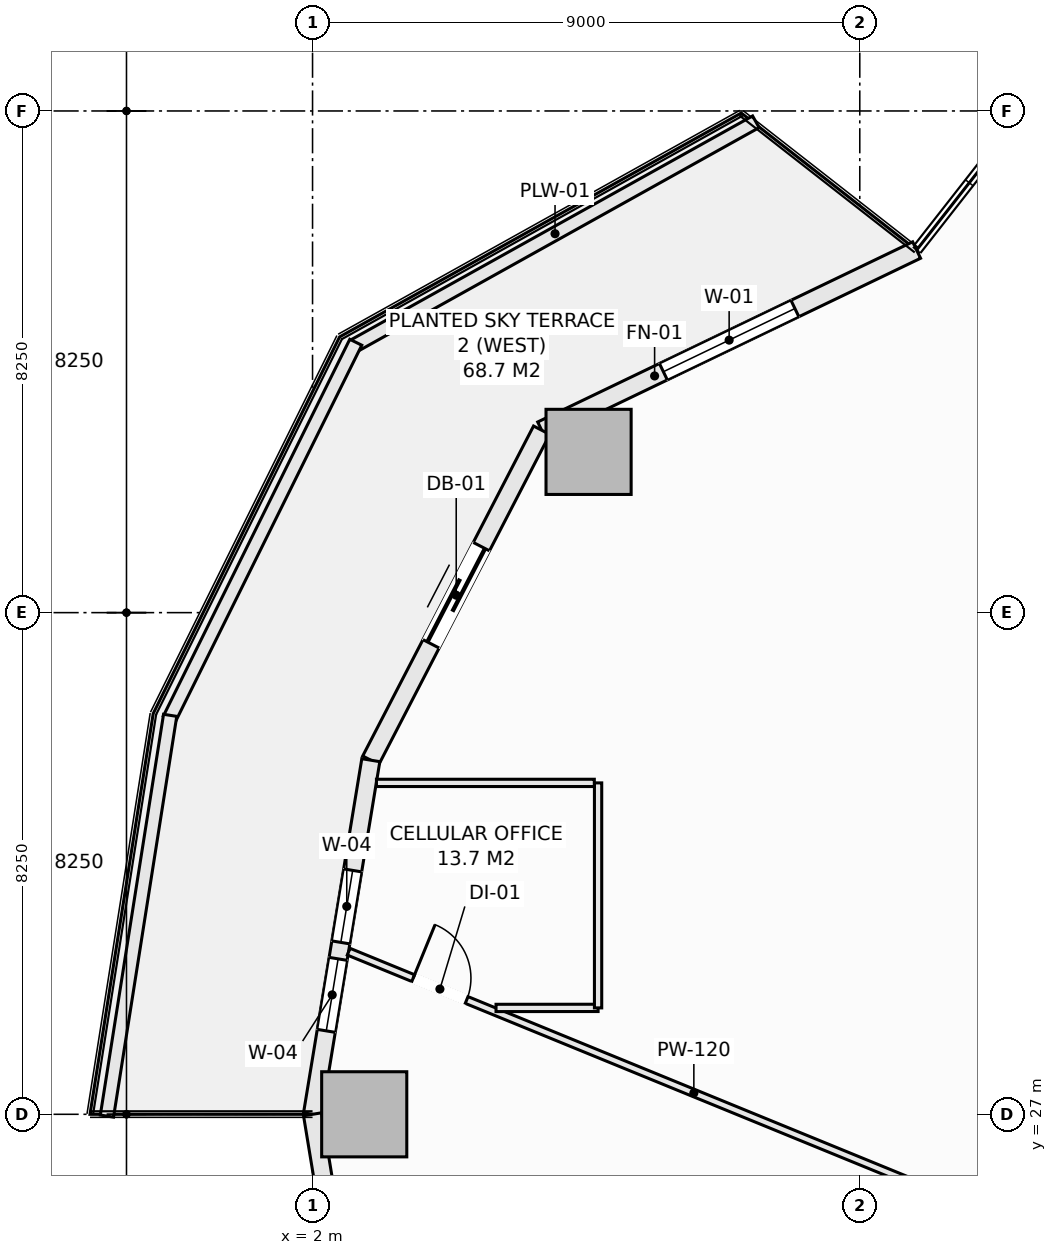
"""IFC4 building model, lengths in metres.
Left out: names, types, materials, properties, quantities, classifications, styles, units other than length and angle.
Written with IfcOpenShell. Run it as: python <this file> out.ifc"""

import sys

from ifc_helpers import new_model, si_unit, direction, frame, frame_2d, origin, origin_2d, place, context, subcontext, project, spatial, rectangle, extrude, element, fill, save


model = new_model("IFC4")
c1 = context("Model", 3, precision=1e-05, world=origin(), true_north=direction((0.0, 1.0)))
c2 = subcontext(c1, "Body", "Model", "MODEL_VIEW")
j1 = project(units=[si_unit("LENGTHUNIT", "METRE"), si_unit("PLANEANGLEUNIT", "RADIAN")], contexts=[c1])
p1 = place(None, origin())
s1 = spatial("IfcSite", under=j1, at=p1, CompositionType="ELEMENT")
p2 = place(p1, origin())
s2 = spatial("IfcBuilding", under=s1, at=p2, CompositionType="ELEMENT")
p3 = place(p2, frame((0.0, 0.0, 30.35)))
s3 = spatial("IfcBuildingStorey", under=s2, at=p3, CompositionType="ELEMENT", Elevation=30.35)
for number, where, z_axis, x_axis in (
    (1, (6.54, 37.894, -0.28), (0.0, 0.0, 1.0), (1.0, 0.0, 0.0)),
    (2, (2.85, 27.0, -0.28), (0.0, 0.0, 1.0), (1.0, 0.0, 0.0)),
):
    element("IfcColumn", number, at=place(p3, frame(where, z_axis=z_axis, x_axis=x_axis)), inside=s3, PredefinedType="COLUMN", context=c2, shape_type="SweptSolid", body=[
        extrude(rectangle(XDim=1.4, YDim=1.4, at=origin_2d()), origin(), (0.0, 0.0, 1.0), 3.85),
    ])
p4 = place(p3, frame((5.768, 38.25, 0.0), z_axis=(0.0, 0.0, 1.0), x_axis=(0.901360393999, 0.433069786673, 0.0)))
e3 = element("IfcWall", 3, at=p4, inside=s3, PredefinedType="SOLIDWALL", context=c2, shape_type="SweptSolid", body=[
    extrude(rectangle(XDim=6.842, YDim=0.3, at=frame_2d((3.421, 0.0))), origin(), (0.0, 0.0, 1.0), 3.093),
])
p5 = place(p4, frame((2.221, 0.0, 0.85)))
e4 = element("IfcOpeningElement", 4, at=p5, cuts=e3, PredefinedType="OPENING", context=c2, shape_type="SweptSolid", body=[
    extrude(rectangle(XDim=2.4, YDim=1.9, at=frame_2d((1.2, 0.95))), frame((0.0, 0.16, 0.0), z_axis=(0.0, -1.0, 0.0), x_axis=(1.0, 0.0, 0.0)), (0.0, 0.0, 1.0), 0.32),
])
p6 = place(p3, frame((2.958, 32.823, 0.0), z_axis=(0.0, 0.0, 1.0), x_axis=(0.459809804413, 0.88801742312, 0.0)))
e5 = element("IfcWall", 5, at=p6, inside=s3, PredefinedType="SOLIDWALL", context=c2, shape_type="SweptSolid", body=[
    extrude(rectangle(XDim=6.111, YDim=0.3, at=frame_2d((3.055, 0.0))), origin(), (0.0, 0.0, 1.0), 3.093),
])
p7 = place(p6, frame((2.155, 0.0, 0.0)))
e6 = element("IfcOpeningElement", 6, at=p7, cuts=e5, PredefinedType="OPENING", context=c2, shape_type="SweptSolid", body=[
    extrude(rectangle(XDim=1.8, YDim=2.25, at=frame_2d((0.9, 1.125))), frame((0.0, 0.16, 0.0), z_axis=(0.0, -1.0, 0.0), x_axis=(1.0, 0.0, 0.0)), (0.0, 0.0, 1.0), 0.32),
])
p8 = place(p3, frame((2.0, 27.0, 0.0), z_axis=(0.0, 0.0, 1.0), x_axis=(0.162366057843, 0.98673059305, 0.0)))
e7 = element("IfcWall", 7, at=p8, inside=s3, PredefinedType="SOLIDWALL", context=c2, shape_type="SweptSolid", body=[
    extrude(rectangle(XDim=5.902, YDim=0.3, at=frame_2d((2.951, 0.0))), origin(), (0.0, 0.0, 1.0), 3.093),
])
p9 = place(p8, frame((1.391, 0.0, 0.85)))
e8 = element("IfcOpeningElement", 8, at=p9, cuts=e7, PredefinedType="OPENING", context=c2, shape_type="SweptSolid", body=[
    extrude(rectangle(XDim=1.2, YDim=1.9, at=frame_2d((0.6, 0.95))), frame((0.0, 0.16, 0.0), z_axis=(0.0, -1.0, 0.0), x_axis=(1.0, 0.0, 0.0)), (0.0, 0.0, 1.0), 0.32),
])
p10 = place(p8, frame((2.865, 0.0, 0.85)))
e9 = element("IfcOpeningElement", 9, at=p10, cuts=e7, PredefinedType="OPENING", context=c2, shape_type="SweptSolid", body=[
    extrude(rectangle(XDim=1.2, YDim=1.9, at=frame_2d((0.6, 0.95))), frame((0.0, 0.16, 0.0), z_axis=(0.0, -1.0, 0.0), x_axis=(1.0, 0.0, 0.0)), (0.0, 0.0, 1.0), 0.32),
])
p11 = place(p3, frame((2.0, 27.0, 0.0), z_axis=(0.0, 0.0, 1.0), x_axis=(0.162366057843, -0.98673059305, 0.0)))
e10 = element("IfcWall", 10, at=p11, inside=s3, PredefinedType="SOLIDWALL", context=c2, shape_type="SweptSolid", body=[
    extrude(rectangle(XDim=5.902, YDim=0.3, at=frame_2d((2.951, 0.0))), origin(), (0.0, 0.0, 1.0), 3.093),
])
p12 = place(p11, frame((1.751, 0.0, 0.85)))
e11 = element("IfcOpeningElement", 11, at=p12, cuts=e10, PredefinedType="OPENING", context=c2, shape_type="SweptSolid", body=[
    extrude(rectangle(XDim=2.4, YDim=1.9, at=frame_2d((1.2, 0.95))), frame((0.0, 0.16, 0.0), z_axis=(0.0, -1.0, 0.0), x_axis=(1.0, 0.0, 0.0)), (0.0, 0.0, 1.0), 0.32),
])
p13 = place(p3, frame((2.685, 39.641, 0.0), z_axis=(0.0, 0.0, 1.0), x_axis=(0.873500119739, 0.48682393205, 0.0)))
e12 = element("IfcWall", 12, at=p13, inside=s3, PredefinedType="PARAPET", context=c2, shape_type="SweptSolid", body=[
    extrude(rectangle(XDim=7.562, YDim=0.22, at=frame_2d((3.781, 0.0))), origin(), (0.0, 0.0, 1.0), 0.52),
])
p14 = place(p3, frame((-0.354, 33.502, 0.0), z_axis=(0.0, 0.0, 1.0), x_axis=(0.443578479433, 0.8962355341, 0.0)))
e13 = element("IfcWall", 13, at=p14, inside=s3, PredefinedType="PARAPET", context=c2, shape_type="SweptSolid", body=[
    extrude(rectangle(XDim=6.911, YDim=0.22, at=frame_2d((3.456, 0.0))), origin(), (0.0, 0.0, 1.0), 0.52),
])
p15 = place(p3, frame((-1.382, 26.971, 0.0), z_axis=(0.0, 0.0, 1.0), x_axis=(0.155842315528, 0.987781945923, 0.0)))
e14 = element("IfcWall", 14, at=p15, inside=s3, PredefinedType="PARAPET", context=c2, shape_type="SweptSolid", body=[
    extrude(rectangle(XDim=6.672, YDim=0.22, at=frame_2d((3.336, 0.0))), origin(), (0.0, 0.0, 1.0), 0.52),
])
p16 = place(p3, frame((2.594, 29.674, 0.0), z_axis=(0.0, 0.0, 1.0), x_axis=(0.925471493768, -0.378817257029, 0.0)))
e15 = element("IfcWall", 15, at=p16, inside=s3, PredefinedType="PARTITIONING", context=c2, shape_type="SweptSolid", body=[
    extrude(rectangle(XDim=12.268, YDim=0.12, at=frame_2d((6.134, 0.0))), origin(), (0.0, 0.0, 1.0), 2.934),
])
p17 = place(p16, frame((1.146, 0.0, 0.0)))
e16 = element("IfcOpeningElement", 16, at=p17, cuts=e15, PredefinedType="OPENING", context=c2, shape_type="SweptSolid", body=[
    extrude(rectangle(XDim=0.95, YDim=2.1, at=frame_2d((0.475, 1.05))), frame((0.0, 0.07, 0.0), z_axis=(0.0, -1.0, 0.0), x_axis=(1.0, 0.0, 0.0)), (0.0, 0.0, 1.0), 0.14),
])
p18 = place(p3, frame((5.018, 28.749, 0.0), z_axis=(0.0, 0.0, 1.0), x_axis=(0.999999830744, 0.000581818083, 0.0)))
e17 = element("IfcWall", 17, at=p18, inside=s3, PredefinedType="PARTITIONING", context=c2, shape_type="SweptSolid", body=[
    extrude(rectangle(XDim=1.678, YDim=0.12, at=frame_2d((0.839, 0.0))), origin(), (0.0, 0.0, 1.0), 3.57),
])
p19 = place(p3, frame((6.696, 28.75, 0.0), z_axis=(0.0, 0.0, 1.0), x_axis=(0.0, 1.0, 0.0)))
e18 = element("IfcWall", 18, at=p19, inside=s3, PredefinedType="PARTITIONING", context=c2, shape_type="SweptSolid", body=[
    extrude(rectangle(XDim=3.7, YDim=0.12, at=frame_2d((1.85, 0.0))), origin(), (0.0, 0.0, 1.0), 3.57),
])
p20 = place(p3, frame((3.051, 32.45, 0.0), z_axis=(0.0, 0.0, 1.0), x_axis=(1.0, 0.0, 0.0)))
e19 = element("IfcWall", 19, at=p20, inside=s3, PredefinedType="PARTITIONING", context=c2, shape_type="SweptSolid", body=[
    extrude(rectangle(XDim=3.583, YDim=0.12, at=frame_2d((1.792, 0.0))), origin(), (0.0, 0.0, 1.0), 3.57),
])
p21 = place(p5, origin())
e20 = element("IfcWindow", 20, at=p21, inside=s3, PartitioningType="SINGLE_PANEL", PredefinedType="WINDOW", context=c2, shape_type="SweptSolid", body=[
    extrude(rectangle(XDim=2.4, YDim=1.9, at=frame_2d((1.2, 0.95))), frame((0.0, 0.03, 0.0), z_axis=(0.0, -1.0, 0.0), x_axis=(1.0, 0.0, 0.0)), (0.0, 0.0, 1.0), 0.06),
])
fill(e4, e20)
p22 = place(p7, origin())
e21 = element("IfcDoor", 21, at=p22, inside=s3, OperationType="SLIDING_TO_LEFT", PredefinedType="DOOR", context=c2, shape_type="SweptSolid", body=[
    extrude(rectangle(XDim=1.8, YDim=2.25, at=frame_2d((0.9, 1.125))), frame((0.0, 0.025, 0.0), z_axis=(0.0, -1.0, 0.0), x_axis=(1.0, 0.0, 0.0)), (0.0, 0.0, 1.0), 0.05),
])
fill(e6, e21)
p23 = place(p9, origin())
e22 = element("IfcWindow", 22, at=p23, inside=s3, PartitioningType="SINGLE_PANEL", PredefinedType="WINDOW", context=c2, shape_type="SweptSolid", body=[
    extrude(rectangle(XDim=1.2, YDim=1.9, at=frame_2d((0.6, 0.95))), frame((0.0, 0.03, 0.0), z_axis=(0.0, -1.0, 0.0), x_axis=(1.0, 0.0, 0.0)), (0.0, 0.0, 1.0), 0.06),
])
fill(e8, e22)
p24 = place(p17, origin())
e23 = element("IfcDoor", 23, at=p24, inside=s3, OperationType="SINGLE_SWING_LEFT", PredefinedType="DOOR", context=c2, shape_type="SweptSolid", body=[
    extrude(rectangle(XDim=0.95, YDim=2.1, at=frame_2d((0.475, 1.05))), frame((0.0, 0.025, 0.0), z_axis=(0.0, -1.0, 0.0), x_axis=(1.0, 0.0, 0.0)), (0.0, 0.0, 1.0), 0.05),
])
fill(e16, e23)
p25 = place(p10, origin())
e24 = element("IfcWindow", 24, at=p25, inside=s3, PartitioningType="SINGLE_PANEL", PredefinedType="WINDOW", context=c2, shape_type="SweptSolid", body=[
    extrude(rectangle(XDim=1.2, YDim=1.9, at=frame_2d((0.6, 0.95))), frame((0.0, 0.03, 0.0), z_axis=(0.0, -1.0, 0.0), x_axis=(1.0, 0.0, 0.0)), (0.0, 0.0, 1.0), 0.06),
])
fill(e9, e24)
save(model, sys.argv[1])
